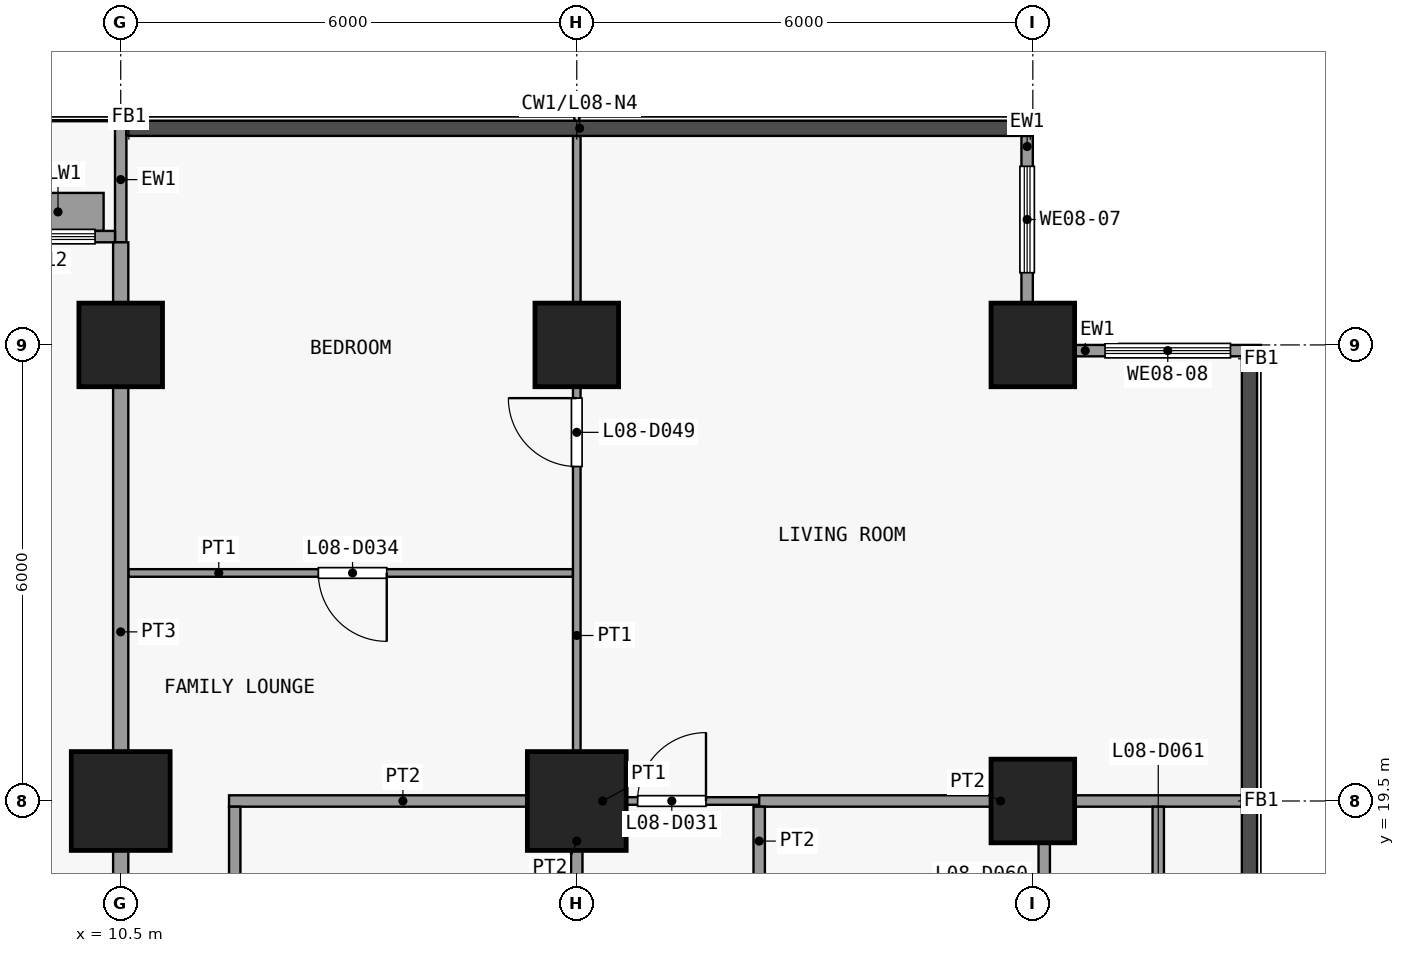
"""IFC4 building model, lengths in metres.
Left out: names, types, materials, properties, quantities, classifications, styles, units other than length and angle.
Written with IfcOpenShell. Run it as: python <this file> out.ifc"""

import sys

from ifc_helpers import new_model, si_unit, direction, frame, frame_2d, origin, origin_2d, place, context, subcontext, project, spatial, rectangle, extrude, element, fill, save


model = new_model("IFC4")
c1 = context("Model", 3, precision=1e-05, world=origin(), true_north=direction((0.0, 1.0)))
c2 = subcontext(c1, "Body", "Model", "MODEL_VIEW")
j1 = project(units=[si_unit("LENGTHUNIT", "METRE"), si_unit("PLANEANGLEUNIT", "RADIAN")], contexts=[c1])
p1 = place(None, origin())
s1 = spatial("IfcSite", under=j1, at=p1, CompositionType="ELEMENT")
p2 = place(p1, origin())
s2 = spatial("IfcBuilding", under=s1, at=p2, CompositionType="ELEMENT")
p3 = place(p2, frame((0.0, 0.0, 39.7)))
s3 = spatial("IfcBuildingStorey", under=s2, at=p3, CompositionType="ELEMENT", Elevation=39.7)
p4 = place(p3, frame((10.5, 19.5, 0.0), z_axis=(0.0, 0.0, 1.0), x_axis=(1.0, 0.0, 0.0)))
e1 = element("IfcColumn", 1, at=p4, inside=s3, PredefinedType="COLUMN", context=c2, shape_type="SweptSolid", body=[
    extrude(rectangle(XDim=1.3, YDim=1.3, at=origin_2d()), origin(), (0.0, 0.0, 1.0), 3.6),
])
p5 = place(p3, frame((10.5, 25.5, 0.0), z_axis=(0.0, 0.0, 1.0), x_axis=(1.0, 0.0, 0.0)))
e2 = element("IfcColumn", 2, at=p5, inside=s3, PredefinedType="COLUMN", context=c2, shape_type="SweptSolid", body=[
    extrude(rectangle(XDim=1.1, YDim=1.1, at=origin_2d()), origin(), (0.0, 0.0, 1.0), 3.6),
])
p6 = place(p3, frame((16.5, 19.5, 0.0), z_axis=(0.0, 0.0, 1.0), x_axis=(1.0, 0.0, 0.0)))
e3 = element("IfcColumn", 3, at=p6, inside=s3, PredefinedType="COLUMN", context=c2, shape_type="SweptSolid", body=[
    extrude(rectangle(XDim=1.3, YDim=1.3, at=origin_2d()), origin(), (0.0, 0.0, 1.0), 3.6),
])
for number, where, z_axis, x_axis in (
    (4, (16.5, 25.5, 0.0), (0.0, 0.0, 1.0), (1.0, 0.0, 0.0)),
    (5, (22.5, 19.5, 0.0), (0.0, 0.0, 1.0), (1.0, 0.0, 0.0)),
    (6, (22.5, 25.5, 0.0), (0.0, 0.0, 1.0), (1.0, 0.0, 0.0)),
):
    element("IfcColumn", number, at=place(p3, frame(where, z_axis=z_axis, x_axis=x_axis)), inside=s3, PredefinedType="COLUMN", context=c2, shape_type="SweptSolid", body=[
        extrude(rectangle(XDim=1.1, YDim=1.1, at=origin_2d()), origin(), (0.0, 0.0, 1.0), 3.6),
    ])
p7 = place(p3, frame((22.425, 28.25, 0.0), z_axis=(0.0, 0.0, 1.0), x_axis=(0.0, -1.0, 0.0)))
e7 = element("IfcWall", 7, at=p7, inside=s3, PredefinedType="SOLIDWALL", context=c2, shape_type="SweptSolid", body=[
    extrude(rectangle(XDim=2.2, YDim=0.15, at=frame_2d((1.1, 0.0))), origin(), (0.0, 0.0, 1.0), 3.3),
])
p8 = place(p7, frame((0.4, 0.0, 0.9)))
e8 = element("IfcOpeningElement", 8, at=p8, cuts=e7, PredefinedType="OPENING", context=c2, shape_type="SweptSolid", body=[
    extrude(rectangle(XDim=1.4, YDim=2.4, at=frame_2d((0.7, 1.2))), frame((0.0, 0.085, 0.0), z_axis=(0.0, -1.0, 0.0), x_axis=(1.0, 0.0, 0.0)), (0.0, 0.0, 1.0), 0.17),
])
p9 = place(p3, frame((23.05, 25.425, 0.0), z_axis=(0.0, 0.0, 1.0), x_axis=(1.0, 0.0, 0.0)))
e9 = element("IfcWall", 9, at=p9, inside=s3, PredefinedType="SOLIDWALL", context=c2, shape_type="SweptSolid", body=[
    extrude(rectangle(XDim=2.45, YDim=0.15, at=frame_2d((1.225, 0.0))), origin(), (0.0, 0.0, 1.0), 3.3),
])
p10 = place(p9, frame((0.4, 0.0, 0.9)))
e10 = element("IfcOpeningElement", 10, at=p10, cuts=e9, PredefinedType="OPENING", context=c2, shape_type="SweptSolid", body=[
    extrude(rectangle(XDim=1.65, YDim=2.4, at=frame_2d((0.825, 1.2))), frame((0.0, 0.085, 0.0), z_axis=(0.0, -1.0, 0.0), x_axis=(1.0, 0.0, 0.0)), (0.0, 0.0, 1.0), 0.17),
])
p11 = place(p3, frame((10.5, 26.85, 0.0), z_axis=(0.0, 0.0, 1.0), x_axis=(0.0, 1.0, 0.0)))
e11 = element("IfcWall", 11, at=p11, inside=s3, PredefinedType="SOLIDWALL", context=c2, shape_type="SweptSolid", body=[
    extrude(rectangle(XDim=1.65, YDim=0.15, at=frame_2d((0.825, 0.0))), origin(), (0.0, 0.0, 1.0), 3.3),
])
p12 = place(p3, frame((4.575, 26.925, 0.0), z_axis=(0.0, 0.0, 1.0), x_axis=(1.0, 0.0, 0.0)))
e12 = element("IfcWall", 12, at=p12, inside=s3, PredefinedType="SOLIDWALL", context=c2, shape_type="SweptSolid", body=[
    extrude(rectangle(XDim=5.85, YDim=0.15, at=frame_2d((2.925, 0.0))), origin(), (0.0, 0.0, 1.0), 3.3),
])
p13 = place(p12, frame((2.325, 0.0, 0.0)))
e13 = element("IfcOpeningElement", 13, at=p13, cuts=e12, PredefinedType="OPENING", context=c2, shape_type="SweptSolid", body=[
    extrude(rectangle(XDim=1.2, YDim=2.4, at=frame_2d((0.6, 1.2))), frame((0.0, 0.085, 0.0), z_axis=(0.0, -1.0, 0.0), x_axis=(1.0, 0.0, 0.0)), (0.0, 0.0, 1.0), 0.17),
])
p14 = place(p12, frame((0.262, 0.0, 0.9)))
e14 = element("IfcOpeningElement", 14, at=p14, cuts=e12, PredefinedType="OPENING", context=c2, shape_type="SweptSolid", body=[
    extrude(rectangle(XDim=1.8, YDim=2.1, at=frame_2d((0.9, 1.05))), frame((0.0, 0.085, 0.0), z_axis=(0.0, -1.0, 0.0), x_axis=(1.0, 0.0, 0.0)), (0.0, 0.0, 1.0), 0.17),
])
p15 = place(p12, frame((3.788, 0.0, 0.9)))
e15 = element("IfcOpeningElement", 15, at=p15, cuts=e12, PredefinedType="OPENING", context=c2, shape_type="SweptSolid", body=[
    extrude(rectangle(XDim=1.8, YDim=2.1, at=frame_2d((0.9, 1.05))), frame((0.0, 0.085, 0.0), z_axis=(0.0, -1.0, 0.0), x_axis=(1.0, 0.0, 0.0)), (0.0, 0.0, 1.0), 0.17),
])
p16 = place(p3, frame((9.075, 27.25, 0.0), z_axis=(0.0, 0.0, 1.0), x_axis=(1.0, 0.0, 0.0)))
e16 = element("IfcWall", 16, at=p16, inside=s3, PredefinedType="USERDEFINED", context=c2, shape_type="SweptSolid", body=[
    extrude(rectangle(XDim=1.2, YDim=0.5, at=frame_2d((0.6, 0.0))), origin(), (0.0, 0.0, 1.0), 0.9),
])
p17 = place(p3, frame((16.5, 19.5, 0.0), z_axis=(0.0, 0.0, 1.0), x_axis=(1.0, 0.0, 0.0)))
e17 = element("IfcWall", 17, at=p17, inside=s3, PredefinedType="PARTITIONING", context=c2, shape_type="SweptSolid", body=[
    extrude(rectangle(XDim=2.4, YDim=0.1, at=frame_2d((1.2, 0.0))), origin(), (0.0, 0.0, 1.0), 3.3),
])
p18 = place(p17, frame((0.8, 0.0, 0.0)))
e18 = element("IfcOpeningElement", 18, at=p18, cuts=e17, PredefinedType="OPENING", context=c2, shape_type="SweptSolid", body=[
    extrude(rectangle(XDim=0.9, YDim=2.1, at=frame_2d((0.45, 1.05))), frame((0.0, 0.06, 0.0), z_axis=(0.0, -1.0, 0.0), x_axis=(1.0, 0.0, 0.0)), (0.0, 0.0, 1.0), 0.12),
])
p19 = place(p3, frame((11.925, 19.5, 0.0), z_axis=(0.0, 0.0, 1.0), x_axis=(1.0, 0.0, 0.0)))
e19 = element("IfcWall", 19, at=p19, inside=s3, PredefinedType="PARTITIONING", context=c2, shape_type="SweptSolid", body=[
    extrude(rectangle(XDim=4.575, YDim=0.15, at=frame_2d((2.288, 0.0))), origin(), (0.0, 0.0, 1.0), 3.3),
])
p20 = place(p3, frame((18.9, 19.5, 0.0), z_axis=(0.0, 0.0, 1.0), x_axis=(1.0, 0.0, 0.0)))
e20 = element("IfcWall", 20, at=p20, inside=s3, PredefinedType="PARTITIONING", context=c2, shape_type="SweptSolid", body=[
    extrude(rectangle(XDim=6.35, YDim=0.15, at=frame_2d((3.175, 0.0))), origin(), (0.0, 0.0, 1.0), 3.3),
])
p21 = place(p3, frame((10.6, 22.5, 0.0), z_axis=(0.0, 0.0, 1.0), x_axis=(1.0, 0.0, 0.0)))
e21 = element("IfcWall", 21, at=p21, inside=s3, PredefinedType="PARTITIONING", context=c2, shape_type="SweptSolid", body=[
    extrude(rectangle(XDim=5.85, YDim=0.1, at=frame_2d((2.925, 0.0))), origin(), (0.0, 0.0, 1.0), 3.3),
])
p22 = place(p21, frame((2.5, 0.0, 0.0)))
e22 = element("IfcOpeningElement", 22, at=p22, cuts=e21, PredefinedType="OPENING", context=c2, shape_type="SweptSolid", body=[
    extrude(rectangle(XDim=0.9, YDim=2.1, at=frame_2d((0.45, 1.05))), frame((0.0, 0.06, 0.0), z_axis=(0.0, -1.0, 0.0), x_axis=(1.0, 0.0, 0.0)), (0.0, 0.0, 1.0), 0.12),
])
p23 = place(p3, frame((10.5, 16.6, 0.0), z_axis=(0.0, 0.0, 1.0), x_axis=(0.0, 1.0, 0.0)))
e23 = element("IfcWall", 23, at=p23, inside=s3, PredefinedType="PARTITIONING", context=c2, shape_type="SweptSolid", body=[
    extrude(rectangle(XDim=10.25, YDim=0.2, at=frame_2d((5.125, 0.0))), origin(), (0.0, 0.0, 1.0), 3.3),
])
p24 = place(p3, frame((12.0, 16.6, 0.0), z_axis=(0.0, 0.0, 1.0), x_axis=(0.0, 1.0, 0.0)))
e24 = element("IfcWall", 24, at=p24, inside=s3, PredefinedType="PARTITIONING", context=c2, shape_type="SweptSolid", body=[
    extrude(rectangle(XDim=2.825, YDim=0.15, at=frame_2d((1.413, 0.0))), origin(), (0.0, 0.0, 1.0), 3.3),
])
p25 = place(p3, frame((16.5, 19.575, 0.0), z_axis=(0.0, 0.0, 1.0), x_axis=(0.0, 1.0, 0.0)))
e25 = element("IfcWall", 25, at=p25, inside=s3, PredefinedType="PARTITIONING", context=c2, shape_type="SweptSolid", body=[
    extrude(rectangle(XDim=8.675, YDim=0.1, at=frame_2d((4.337, 0.0))), origin(), (0.0, 0.0, 1.0), 3.3),
])
p26 = place(p25, frame((4.325, 0.0, 0.0)))
e26 = element("IfcOpeningElement", 26, at=p26, cuts=e25, PredefinedType="OPENING", context=c2, shape_type="SweptSolid", body=[
    extrude(rectangle(XDim=0.9, YDim=2.1, at=frame_2d((0.45, 1.05))), frame((0.0, 0.06, 0.0), z_axis=(0.0, -1.0, 0.0), x_axis=(1.0, 0.0, 0.0)), (0.0, 0.0, 1.0), 0.12),
])
p27 = place(p3, frame((16.5, 16.6, 0.0), z_axis=(0.0, 0.0, 1.0), x_axis=(0.0, 1.0, 0.0)))
e27 = element("IfcWall", 27, at=p27, inside=s3, PredefinedType="PARTITIONING", context=c2, shape_type="SweptSolid", body=[
    extrude(rectangle(XDim=2.825, YDim=0.15, at=frame_2d((1.413, 0.0))), origin(), (0.0, 0.0, 1.0), 3.3),
])
p28 = place(p27, frame((0.9, 0.0, 0.0)))
e28 = element("IfcOpeningElement", 28, at=p28, cuts=e27, PredefinedType="OPENING", context=c2, shape_type="SweptSolid", body=[
    extrude(rectangle(XDim=0.9, YDim=2.1, at=frame_2d((0.45, 1.05))), frame((0.0, 0.085, 0.0), z_axis=(0.0, -1.0, 0.0), x_axis=(1.0, 0.0, 0.0)), (0.0, 0.0, 1.0), 0.17),
])
p29 = place(p3, frame((18.9, 16.6, 0.0), z_axis=(0.0, 0.0, 1.0), x_axis=(0.0, 1.0, 0.0)))
e29 = element("IfcWall", 29, at=p29, inside=s3, PredefinedType="PARTITIONING", context=c2, shape_type="SweptSolid", body=[
    extrude(rectangle(XDim=2.825, YDim=0.15, at=frame_2d((1.413, 0.0))), origin(), (0.0, 0.0, 1.0), 3.3),
])
p30 = place(p29, frame((0.9, 0.0, 0.0)))
e30 = element("IfcOpeningElement", 30, at=p30, cuts=e29, PredefinedType="OPENING", context=c2, shape_type="SweptSolid", body=[
    extrude(rectangle(XDim=0.9, YDim=2.1, at=frame_2d((0.45, 1.05))), frame((0.0, 0.085, 0.0), z_axis=(0.0, -1.0, 0.0), x_axis=(1.0, 0.0, 0.0)), (0.0, 0.0, 1.0), 0.17),
])
p31 = place(p3, frame((22.65, 16.6, 0.0), z_axis=(0.0, 0.0, 1.0), x_axis=(0.0, 1.0, 0.0)))
e31 = element("IfcWall", 31, at=p31, inside=s3, PredefinedType="PARTITIONING", context=c2, shape_type="SweptSolid", body=[
    extrude(rectangle(XDim=2.825, YDim=0.15, at=frame_2d((1.413, 0.0))), origin(), (0.0, 0.0, 1.0), 3.3),
])
p32 = place(p31, frame((1.0, 0.0, 0.0)))
e32 = element("IfcOpeningElement", 32, at=p32, cuts=e31, PredefinedType="OPENING", context=c2, shape_type="SweptSolid", body=[
    extrude(rectangle(XDim=0.9, YDim=2.1, at=frame_2d((0.45, 1.05))), frame((0.0, 0.085, 0.0), z_axis=(0.0, -1.0, 0.0), x_axis=(1.0, 0.0, 0.0)), (0.0, 0.0, 1.0), 0.17),
])
p33 = place(p3, frame((24.15, 16.6, 0.0), z_axis=(0.0, 0.0, 1.0), x_axis=(0.0, 1.0, 0.0)))
e33 = element("IfcWall", 33, at=p33, inside=s3, PredefinedType="PARTITIONING", context=c2, shape_type="SweptSolid", body=[
    extrude(rectangle(XDim=2.825, YDim=0.15, at=frame_2d((1.413, 0.0))), origin(), (0.0, 0.0, 1.0), 3.3),
])
p34 = place(p33, frame((1.0, 0.0, 0.0)))
e34 = element("IfcOpeningElement", 34, at=p34, cuts=e33, PredefinedType="OPENING", context=c2, shape_type="SweptSolid", body=[
    extrude(rectangle(XDim=0.9, YDim=2.1, at=frame_2d((0.45, 1.05))), frame((0.0, 0.085, 0.0), z_axis=(0.0, -1.0, 0.0), x_axis=(1.0, 0.0, 0.0)), (0.0, 0.0, 1.0), 0.17),
])
p35 = place(p8, origin())
e35 = element("IfcWindow", 35, at=p35, inside=s3, PartitioningType="SINGLE_PANEL", PredefinedType="WINDOW", context=c2, shape_type="SweptSolid", body=[
    extrude(rectangle(XDim=1.4, YDim=2.4, at=frame_2d((0.7, 1.2))), frame((0.0, 0.03, 0.0), z_axis=(0.0, -1.0, 0.0), x_axis=(1.0, 0.0, 0.0)), (0.0, 0.0, 1.0), 0.06),
])
fill(e8, e35)
p36 = place(p10, origin())
e36 = element("IfcWindow", 36, at=p36, inside=s3, PartitioningType="SINGLE_PANEL", PredefinedType="WINDOW", context=c2, shape_type="SweptSolid", body=[
    extrude(rectangle(XDim=1.65, YDim=2.4, at=frame_2d((0.825, 1.2))), frame((0.0, 0.03, 0.0), z_axis=(0.0, -1.0, 0.0), x_axis=(1.0, 0.0, 0.0)), (0.0, 0.0, 1.0), 0.06),
])
fill(e10, e36)
p37 = place(p15, origin())
e37 = element("IfcWindow", 37, at=p37, inside=s3, PartitioningType="SINGLE_PANEL", PredefinedType="WINDOW", context=c2, shape_type="SweptSolid", body=[
    extrude(rectangle(XDim=1.8, YDim=2.1, at=frame_2d((0.9, 1.05))), frame((0.0, 0.03, 0.0), z_axis=(0.0, -1.0, 0.0), x_axis=(1.0, 0.0, 0.0)), (0.0, 0.0, 1.0), 0.06),
])
fill(e15, e37)
p38 = place(p18, origin())
e38 = element("IfcDoor", 38, at=p38, inside=s3, OperationType="SINGLE_SWING_LEFT", PredefinedType="DOOR", context=c2, shape_type="SweptSolid", body=[
    extrude(rectangle(XDim=0.9, YDim=2.1, at=frame_2d((0.45, 1.05))), frame((0.0, 0.025, 0.0), z_axis=(0.0, -1.0, 0.0), x_axis=(1.0, 0.0, 0.0)), (0.0, 0.0, 1.0), 0.05),
])
fill(e18, e38)
p39 = place(p22, origin())
e39 = element("IfcDoor", 39, at=p39, inside=s3, OperationType="SINGLE_SWING_RIGHT", PredefinedType="DOOR", context=c2, shape_type="SweptSolid", body=[
    extrude(rectangle(XDim=0.9, YDim=2.1, at=frame_2d((0.45, 1.05))), frame((0.0, 0.025, 0.0), z_axis=(0.0, -1.0, 0.0), x_axis=(1.0, 0.0, 0.0)), (0.0, 0.0, 1.0), 0.05),
])
fill(e22, e39)
p40 = place(p26, origin())
e40 = element("IfcDoor", 40, at=p40, inside=s3, OperationType="SINGLE_SWING_LEFT", PredefinedType="DOOR", context=c2, shape_type="SweptSolid", body=[
    extrude(rectangle(XDim=0.9, YDim=2.1, at=frame_2d((0.45, 1.05))), frame((0.0, 0.025, 0.0), z_axis=(0.0, -1.0, 0.0), x_axis=(1.0, 0.0, 0.0)), (0.0, 0.0, 1.0), 0.05),
])
fill(e26, e40)
save(model, sys.argv[1])
